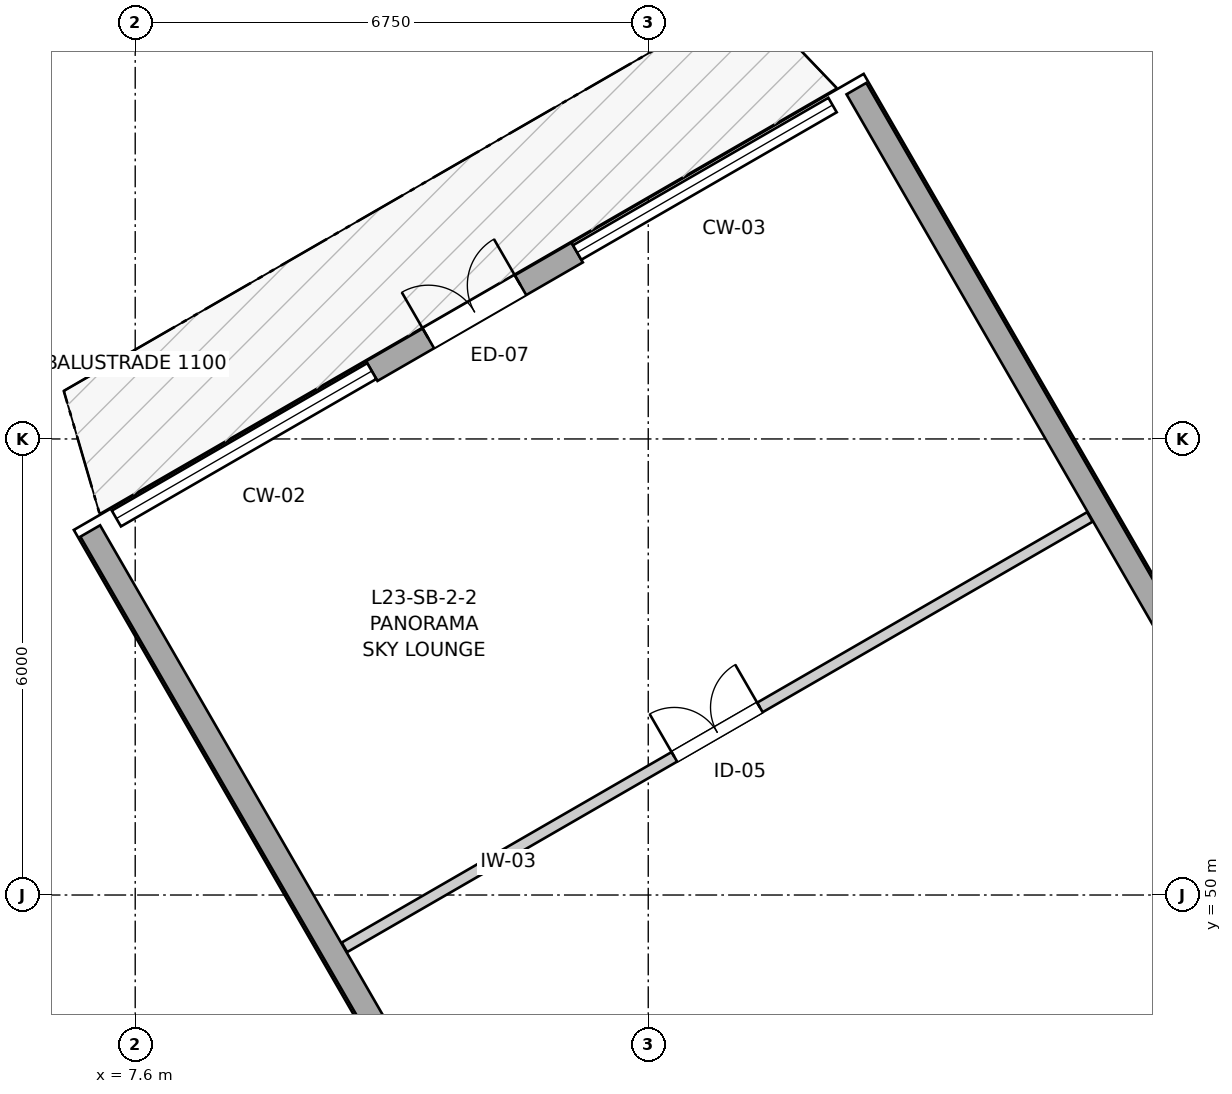
"""IFC4 building model, lengths in metres.
Left out: names, types, materials, properties, quantities, classifications, styles, units other than length and angle.
Written with IfcOpenShell. Run it as: python <this file> out.ifc"""

import sys

from ifc_helpers import new_model, si_unit, direction, frame, frame_2d, origin, place, context, subcontext, project, spatial, rectangle, extrude, source, transform, mapped, element, fill, save


model = new_model("IFC4")
c1 = context("Model", 3, precision=1e-05, world=origin(), true_north=direction((0.0, 1.0)))
c2 = subcontext(c1, "Body", "Model", "MODEL_VIEW")
j1 = project(units=[si_unit("LENGTHUNIT", "METRE"), si_unit("PLANEANGLEUNIT", "RADIAN")], contexts=[c1])
p1 = place(None, origin())
s1 = spatial("IfcSite", under=j1, at=p1, CompositionType="ELEMENT")
p2 = place(p1, origin())
s2 = spatial("IfcBuilding", under=s1, at=p2, CompositionType="ELEMENT")
p3 = place(p2, frame((0.0, 0.0, 80.0)))
s3 = spatial("IfcBuildingStorey", under=s2, at=p3, CompositionType="ELEMENT", Elevation=80.0)
for number, where, z_axis, x_axis in (
    (1, (17.31, 36.946, 0.0), (0.0, 0.0, 1.0), (-0.5, 0.866, 0.0)),
    (2, (27.39, 42.766, 0.0), (0.0, 0.0, 1.0), (-0.5, 0.866, 0.0)),
):
    element("IfcWall", number, at=place(p3, frame(where, z_axis=z_axis, x_axis=x_axis)), inside=s3, PredefinedType="SOLIDWALL", context=c2, shape_type="SweptSolid", body=[
        extrude(rectangle(XDim=20.603, YDim=0.3, at=frame_2d((10.302, 0.0))), origin(), (0.0, 0.0, 1.0), 2.115),
    ])
p4 = place(p3, frame((10.712, 56.893, 0.0), z_axis=(0.0, 0.0, 1.0), x_axis=(0.866029224906, 0.499993381564, 0.0)))
e3 = element("IfcWall", 3, at=p4, inside=s3, PredefinedType="SOLIDWALL", context=c2, shape_type="SweptSolid", body=[
    extrude(rectangle(XDim=3.12, YDim=0.3, at=frame_2d((1.56, 0.0))), origin(), (0.0, 0.0, 1.0), 2.3),
])
p5 = place(p4, frame((0.86, 0.0, 0.0)))
e4 = element("IfcOpeningElement", 4, at=p5, cuts=e3, PredefinedType="OPENING", context=c2, shape_type="SweptSolid", body=[
    extrude(rectangle(XDim=1.4, YDim=2.15, at=frame_2d((0.7, 1.075))), frame((0.0, 0.16, 0.0), z_axis=(0.0, -1.0, 0.0), x_axis=(1.0, 0.0, 0.0)), (0.0, 0.0, 1.0), 0.32),
])
p6 = place(p3, frame((10.353, 49.312, 0.0), z_axis=(0.0, 0.0, 1.0), x_axis=(0.866036235619, 0.499981238243, 0.0)))
e5 = element("IfcWall", 5, at=p6, inside=s3, PredefinedType="PARTITIONING", context=c2, shape_type="SweptSolid", body=[
    extrude(rectangle(XDim=11.324, YDim=0.145, at=frame_2d((5.662, 0.0))), origin(), (0.0, 0.0, 1.0), 2.353),
])
p7 = place(p6, frame((5.012, 0.0, 0.0)))
e6 = element("IfcOpeningElement", 6, at=p7, cuts=e5, PredefinedType="OPENING", context=c2, shape_type="SweptSolid", body=[
    extrude(rectangle(XDim=1.3, YDim=2.1, at=frame_2d((0.65, 1.05))), frame((0.0, 0.083, 0.0), z_axis=(0.0, -1.0, 0.0), x_axis=(1.0, 0.0, 0.0)), (0.0, 0.0, 1.0), 0.165),
])
m1 = source(origin(), c2, "Body", "SweptSolid", [
    extrude(rectangle(XDim=1.4, YDim=2.15, at=frame_2d((0.7, 1.075))), frame((0.0, 0.025, 0.0), z_axis=(0.0, -1.0, 0.0), x_axis=(1.0, 0.0, 0.0)), (0.0, 0.0, 1.0), 0.05),
])
p8 = place(p5, origin())
e7 = element("IfcDoor", 7, at=p8, inside=s3, OperationType="DOUBLE_DOOR_SINGLE_SWING", PredefinedType="DOOR", context=c2, shape_type="MappedRepresentation", body=[
    mapped(m1, transform((0.0, 0.0, 0.0), x_axis=(1.0, 0.0, 0.0), y_axis=(0.0, 1.0, 0.0), z_axis=(0.0, 0.0, 1.0), scale=1.0)),
])
fill(e4, e7)
m2 = source(origin(), c2, "Body", "SweptSolid", [
    extrude(rectangle(XDim=1.3, YDim=2.1, at=frame_2d((0.65, 1.05))), frame((0.0, 0.025, 0.0), z_axis=(0.0, -1.0, 0.0), x_axis=(1.0, 0.0, 0.0)), (0.0, 0.0, 1.0), 0.05),
])
p9 = place(p7, origin())
e8 = element("IfcDoor", 8, at=p9, inside=s3, OperationType="DOUBLE_DOOR_SINGLE_SWING", PredefinedType="DOOR", context=c2, shape_type="MappedRepresentation", body=[
    mapped(m2, transform((0.0, 0.0, 0.0), x_axis=(1.0, 0.0, 0.0), y_axis=(0.0, 1.0, 0.0), z_axis=(0.0, 0.0, 1.0), scale=1.0)),
])
fill(e6, e8)
save(model, sys.argv[1])
